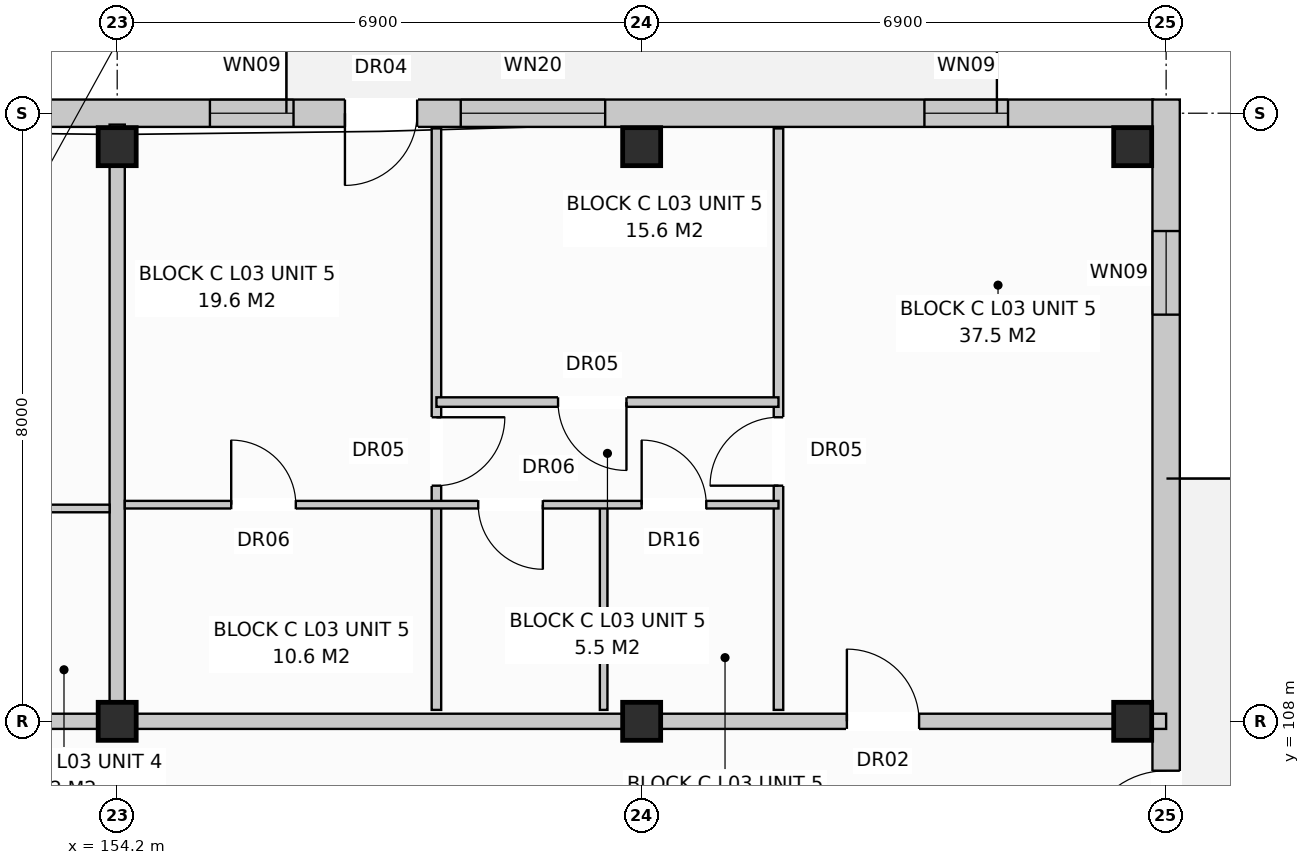
"""IFC4 building model, lengths in metres.
Left out: names, types, materials, properties, quantities, classifications, styles, units other than length and angle.
Written with IfcOpenShell. Run it as: python <this file> out.ifc"""

import sys

from ifc_helpers import new_model, si_unit, direction, frame, frame_2d, origin, origin_with_axes, origin_2d, place, context, subcontext, project, spatial, rectangle, extrude, element, fill, save


model = new_model("IFC4")
c1 = context("Model", 3, precision=1e-05, world=origin(), true_north=direction((0.0, 1.0)))
c2 = subcontext(c1, "Body", "Model", "MODEL_VIEW")
j1 = project(units=[si_unit("LENGTHUNIT", "METRE"), si_unit("PLANEANGLEUNIT", "RADIAN")], contexts=[c1])
p1 = place(None, origin())
s1 = spatial("IfcSite", under=j1, at=p1, CompositionType="ELEMENT")
p2 = place(p1, origin())
s2 = spatial("IfcBuilding", under=s1, at=p2, CompositionType="ELEMENT")
p3 = place(p2, frame((0.0, 0.0, 11.2)))
s3 = spatial("IfcBuildingStorey", under=s2, at=p3, CompositionType="ELEMENT", Elevation=11.2)
for number, where, z_axis, x_axis in (
    (1, (154.2, 108.0, 0.0), (0.0, 0.0, 1.0), (1.0, 0.0, 0.0)),
    (2, (154.2, 115.56, 0.0), (0.0, 0.0, 1.0), (1.0, 0.0, 0.0)),
    (3, (161.1, 108.0, 0.0), (0.0, 0.0, 1.0), (1.0, 0.0, 0.0)),
    (4, (161.1, 115.56, 0.0), (0.0, 0.0, 1.0), (1.0, 0.0, 0.0)),
    (5, (167.56, 108.0, 0.0), (0.0, 0.0, 1.0), (1.0, 0.0, 0.0)),
    (6, (167.56, 115.56, 0.0), (0.0, 0.0, 1.0), (1.0, 0.0, 0.0)),
):
    element("IfcColumn", number, at=place(p3, frame(where, z_axis=z_axis, x_axis=x_axis)), inside=s3, PredefinedType="COLUMN", context=c2, shape_type="SweptSolid", body=[
        extrude(rectangle(XDim=0.5, YDim=0.5, at=origin_2d()), origin(), (0.0, 0.0, 1.0), 3.2),
    ])
p4 = place(p3, frame((112.97, 116.0, 0.0), z_axis=(0.0, 0.0, 1.0), x_axis=(1.0, 0.0, 0.0)))
e7 = element("IfcWall", 7, at=p4, inside=s3, PredefinedType="STANDARD", context=c2, shape_type="SweptSolid", body=[
    extrude(rectangle(XDim=54.86, YDim=0.36, at=frame_2d((27.43, 0.0))), origin(), (0.0, 0.0, 1.0), 2.94),
])
p5 = place(p4, frame((2.497, 0.0, 0.0)))
e8 = element("IfcOpeningElement", 8, at=p5, cuts=e7, PredefinedType="OPENING", context=c2, shape_type="SweptSolid", body=[
    extrude(rectangle(XDim=0.95, YDim=2.1, at=frame_2d((0.475, 1.05))), frame((0.0, 0.192, 0.0), z_axis=(0.0, -1.0, 0.0), x_axis=(1.0, 0.0, 0.0)), (0.0, 0.0, 1.0), 0.384),
])
p6 = place(p4, frame((17.026, 0.0, 0.0)))
e9 = element("IfcOpeningElement", 9, at=p6, cuts=e7, PredefinedType="OPENING", context=c2, shape_type="SweptSolid", body=[
    extrude(rectangle(XDim=0.95, YDim=2.1, at=frame_2d((0.475, 1.05))), frame((0.0, 0.192, 0.0), z_axis=(0.0, -1.0, 0.0), x_axis=(1.0, 0.0, 0.0)), (0.0, 0.0, 1.0), 0.384),
])
p7 = place(p4, frame((30.126, 0.0, 0.0)))
e10 = element("IfcOpeningElement", 10, at=p7, cuts=e7, PredefinedType="OPENING", context=c2, shape_type="SweptSolid", body=[
    extrude(rectangle(XDim=0.95, YDim=2.1, at=frame_2d((0.475, 1.05))), frame((0.0, 0.192, 0.0), z_axis=(0.0, -1.0, 0.0), x_axis=(1.0, 0.0, 0.0)), (0.0, 0.0, 1.0), 0.384),
])
p8 = place(p4, frame((44.226, 0.0, 0.0)))
e11 = element("IfcOpeningElement", 11, at=p8, cuts=e7, PredefinedType="OPENING", context=c2, shape_type="SweptSolid", body=[
    extrude(rectangle(XDim=0.95, YDim=2.1, at=frame_2d((0.475, 1.05))), frame((0.0, 0.192, 0.0), z_axis=(0.0, -1.0, 0.0), x_axis=(1.0, 0.0, 0.0)), (0.0, 0.0, 1.0), 0.384),
])
p9 = place(p4, frame((0.645, 0.0, 0.85)))
e12 = element("IfcOpeningElement", 12, at=p9, cuts=e7, PredefinedType="OPENING", context=c2, shape_type="SweptSolid", body=[
    extrude(rectangle(XDim=1.55, YDim=1.55, at=frame_2d((0.775, 0.775))), frame((0.0, 0.192, 0.0), z_axis=(0.0, -1.0, 0.0), x_axis=(1.0, 0.0, 0.0)), (0.0, 0.0, 1.0), 0.384),
])
p10 = place(p4, frame((4.3, 0.0, 0.8)))
e13 = element("IfcOpeningElement", 13, at=p10, cuts=e7, PredefinedType="OPENING", context=c2, shape_type="SweptSolid", body=[
    extrude(rectangle(XDim=1.8, YDim=1.7, at=frame_2d((0.9, 0.85))), frame((0.0, 0.192, 0.0), z_axis=(0.0, -1.0, 0.0), x_axis=(1.0, 0.0, 0.0)), (0.0, 0.0, 1.0), 0.384),
])
p11 = place(p4, frame((9.35, 0.0, 0.72)))
e14 = element("IfcOpeningElement", 14, at=p11, cuts=e7, PredefinedType="OPENING", context=c2, shape_type="SweptSolid", body=[
    extrude(rectangle(XDim=1.1, YDim=1.5, at=frame_2d((0.55, 0.75))), frame((0.0, 0.192, 0.0), z_axis=(0.0, -1.0, 0.0), x_axis=(1.0, 0.0, 0.0)), (0.0, 0.0, 1.0), 0.384),
])
p12 = place(p4, frame((15.05, 0.0, 0.72)))
e15 = element("IfcOpeningElement", 15, at=p12, cuts=e7, PredefinedType="OPENING", context=c2, shape_type="SweptSolid", body=[
    extrude(rectangle(XDim=1.1, YDim=1.5, at=frame_2d((0.55, 0.75))), frame((0.0, 0.192, 0.0), z_axis=(0.0, -1.0, 0.0), x_axis=(1.0, 0.0, 0.0)), (0.0, 0.0, 1.0), 0.384),
])
p13 = place(p4, frame((21.1, 0.0, 0.8)))
e16 = element("IfcOpeningElement", 16, at=p13, cuts=e7, PredefinedType="OPENING", context=c2, shape_type="SweptSolid", body=[
    extrude(rectangle(XDim=1.8, YDim=1.7, at=frame_2d((0.9, 0.85))), frame((0.0, 0.192, 0.0), z_axis=(0.0, -1.0, 0.0), x_axis=(1.0, 0.0, 0.0)), (0.0, 0.0, 1.0), 0.384),
])
p14 = place(p4, frame((24.85, 0.0, 0.72)))
e17 = element("IfcOpeningElement", 17, at=p14, cuts=e7, PredefinedType="OPENING", context=c2, shape_type="SweptSolid", body=[
    extrude(rectangle(XDim=1.1, YDim=1.5, at=frame_2d((0.55, 0.75))), frame((0.0, 0.192, 0.0), z_axis=(0.0, -1.0, 0.0), x_axis=(1.0, 0.0, 0.0)), (0.0, 0.0, 1.0), 0.384),
])
p15 = place(p4, frame((28.35, 0.0, 0.72)))
e18 = element("IfcOpeningElement", 18, at=p15, cuts=e7, PredefinedType="OPENING", context=c2, shape_type="SweptSolid", body=[
    extrude(rectangle(XDim=1.1, YDim=1.5, at=frame_2d((0.55, 0.75))), frame((0.0, 0.192, 0.0), z_axis=(0.0, -1.0, 0.0), x_axis=(1.0, 0.0, 0.0)), (0.0, 0.0, 1.0), 0.384),
])
p16 = place(p4, frame((31.9, 0.0, 0.8)))
e19 = element("IfcOpeningElement", 19, at=p16, cuts=e7, PredefinedType="OPENING", context=c2, shape_type="SweptSolid", body=[
    extrude(rectangle(XDim=1.8, YDim=1.7, at=frame_2d((0.9, 0.85))), frame((0.0, 0.192, 0.0), z_axis=(0.0, -1.0, 0.0), x_axis=(1.0, 0.0, 0.0)), (0.0, 0.0, 1.0), 0.384),
])
p17 = place(p4, frame((35.55, 0.0, 0.72)))
e20 = element("IfcOpeningElement", 20, at=p17, cuts=e7, PredefinedType="OPENING", context=c2, shape_type="SweptSolid", body=[
    extrude(rectangle(XDim=1.9, YDim=1.85, at=frame_2d((0.95, 0.925))), frame((0.0, 0.192, 0.0), z_axis=(0.0, -1.0, 0.0), x_axis=(1.0, 0.0, 0.0)), (0.0, 0.0, 1.0), 0.384),
])
p18 = place(p4, frame((39.25, 0.0, 0.72)))
e21 = element("IfcOpeningElement", 21, at=p18, cuts=e7, PredefinedType="OPENING", context=c2, shape_type="SweptSolid", body=[
    extrude(rectangle(XDim=1.1, YDim=1.5, at=frame_2d((0.55, 0.75))), frame((0.0, 0.192, 0.0), z_axis=(0.0, -1.0, 0.0), x_axis=(1.0, 0.0, 0.0)), (0.0, 0.0, 1.0), 0.384),
])
p19 = place(p4, frame((42.45, 0.0, 0.72)))
e22 = element("IfcOpeningElement", 22, at=p19, cuts=e7, PredefinedType="OPENING", context=c2, shape_type="SweptSolid", body=[
    extrude(rectangle(XDim=1.1, YDim=1.5, at=frame_2d((0.55, 0.75))), frame((0.0, 0.192, 0.0), z_axis=(0.0, -1.0, 0.0), x_axis=(1.0, 0.0, 0.0)), (0.0, 0.0, 1.0), 0.384),
])
p20 = place(p4, frame((45.75, 0.0, 0.72)))
e23 = element("IfcOpeningElement", 23, at=p20, cuts=e7, PredefinedType="OPENING", context=c2, shape_type="SweptSolid", body=[
    extrude(rectangle(XDim=1.9, YDim=1.85, at=frame_2d((0.95, 0.925))), frame((0.0, 0.192, 0.0), z_axis=(0.0, -1.0, 0.0), x_axis=(1.0, 0.0, 0.0)), (0.0, 0.0, 1.0), 0.384),
])
p21 = place(p4, frame((51.85, 0.0, 0.72)))
e24 = element("IfcOpeningElement", 24, at=p21, cuts=e7, PredefinedType="OPENING", context=c2, shape_type="SweptSolid", body=[
    extrude(rectangle(XDim=1.1, YDim=1.5, at=frame_2d((0.55, 0.75))), frame((0.0, 0.192, 0.0), z_axis=(0.0, -1.0, 0.0), x_axis=(1.0, 0.0, 0.0)), (0.0, 0.0, 1.0), 0.384),
])
p22 = place(p3, frame((168.0, 97.42, 0.0), z_axis=(0.0, 0.0, 1.0), x_axis=(0.0, 1.0, 0.0)))
e25 = element("IfcWall", 25, at=p22, inside=s3, PredefinedType="STANDARD", context=c2, shape_type="SweptSolid", body=[
    extrude(rectangle(XDim=18.76, YDim=0.36, at=frame_2d((9.38, 0.0))), origin(), (0.0, 0.0, 1.0), 2.94),
])
p23 = place(p22, frame((8.83, 0.0, 0.0)))
e26 = element("IfcOpeningElement", 26, at=p23, cuts=e25, PredefinedType="OPENING", context=c2, shape_type="SweptSolid", body=[
    extrude(rectangle(XDim=1.1, YDim=2.1, at=frame_2d((0.55, 1.05))), frame((0.0, 0.192, 0.0), z_axis=(0.0, -1.0, 0.0), x_axis=(1.0, 0.0, 0.0)), (0.0, 0.0, 1.0), 0.384),
])
p24 = place(p22, frame((1.73, 0.0, 0.72)))
e27 = element("IfcOpeningElement", 27, at=p24, cuts=e25, PredefinedType="OPENING", context=c2, shape_type="SweptSolid", body=[
    extrude(rectangle(XDim=1.1, YDim=1.5, at=frame_2d((0.55, 0.75))), frame((0.0, 0.192, 0.0), z_axis=(0.0, -1.0, 0.0), x_axis=(1.0, 0.0, 0.0)), (0.0, 0.0, 1.0), 0.384),
])
p25 = place(p22, frame((15.93, 0.0, 0.72)))
e28 = element("IfcOpeningElement", 28, at=p25, cuts=e25, PredefinedType="OPENING", context=c2, shape_type="SweptSolid", body=[
    extrude(rectangle(XDim=1.1, YDim=1.5, at=frame_2d((0.55, 0.75))), frame((0.0, 0.192, 0.0), z_axis=(0.0, -1.0, 0.0), x_axis=(1.0, 0.0, 0.0)), (0.0, 0.0, 1.0), 0.384),
])
p26 = place(p3, frame((154.2, 108.15, 0.0), z_axis=(0.0, 0.0, 1.0), x_axis=(0.0, 1.0, 0.0)))
e29 = element("IfcWall", 29, at=p26, inside=s3, PredefinedType="PARTITIONING", context=c2, shape_type="SweptSolid", body=[
    extrude(rectangle(XDim=7.7, YDim=0.2, at=frame_2d((3.85, 0.0))), origin(), (0.0, 0.0, 1.0), 2.94),
])
p27 = place(p3, frame((147.3, 108.0, 0.0), z_axis=(0.0, 0.0, 1.0), x_axis=(1.0, 0.0, 0.0)))
e30 = element("IfcWall", 30, at=p27, inside=s3, PredefinedType="PARTITIONING", context=c2, shape_type="SweptSolid", body=[
    extrude(rectangle(XDim=6.9, YDim=0.2, at=frame_2d((3.45, 0.0))), origin(), (0.0, 0.0, 1.0), 2.38),
])
p28 = place(p27, frame((2.0, 0.0, 0.0)))
e31 = element("IfcOpeningElement", 31, at=p28, cuts=e30, PredefinedType="OPENING", context=c2, shape_type="SweptSolid", body=[
    extrude(rectangle(XDim=0.95, YDim=2.15, at=frame_2d((0.475, 1.075))), frame((0.0, 0.112, 0.0), z_axis=(0.0, -1.0, 0.0), x_axis=(1.0, 0.0, 0.0)), (0.0, 0.0, 1.0), 0.224),
])
p29 = place(p3, frame((151.6, 110.8, 0.0), z_axis=(0.0, 0.0, 1.0), x_axis=(1.0, 0.0, 0.0)))
e32 = element("IfcWall", 32, at=p29, inside=s3, PredefinedType="PARTITIONING", context=c2, shape_type="SweptSolid", body=[
    extrude(rectangle(XDim=2.5, YDim=0.1, at=frame_2d((1.25, 0.0))), origin(), (0.0, 0.0, 1.0), 2.94),
])
p30 = place(p3, frame((154.2, 108.0, 0.0), z_axis=(0.0, 0.0, 1.0), x_axis=(1.0, 0.0, 0.0)))
e33 = element("IfcWall", 33, at=p30, inside=s3, PredefinedType="PARTITIONING", context=c2, shape_type="SweptSolid", body=[
    extrude(rectangle(XDim=13.8, YDim=0.2, at=frame_2d((6.9, 0.0))), origin(), (0.0, 0.0, 1.0), 2.38),
])
p31 = place(p30, frame((9.6, 0.0, 0.0)))
e34 = element("IfcOpeningElement", 34, at=p31, cuts=e33, PredefinedType="OPENING", context=c2, shape_type="SweptSolid", body=[
    extrude(rectangle(XDim=0.95, YDim=2.15, at=frame_2d((0.475, 1.075))), frame((0.0, 0.112, 0.0), z_axis=(0.0, -1.0, 0.0), x_axis=(1.0, 0.0, 0.0)), (0.0, 0.0, 1.0), 0.224),
])
p32 = place(p3, frame((162.9, 108.15, 0.0), z_axis=(0.0, 0.0, 1.0), x_axis=(0.0, 1.0, 0.0)))
e35 = element("IfcWall", 35, at=p32, inside=s3, PredefinedType="PARTITIONING", context=c2, shape_type="SweptSolid", body=[
    extrude(rectangle(XDim=7.65, YDim=0.125, at=frame_2d((3.825, 0.0))), origin(), (0.0, 0.0, 1.0), 2.94),
])
p33 = place(p32, frame((2.95, 0.0, 0.0)))
e36 = element("IfcOpeningElement", 36, at=p33, cuts=e35, PredefinedType="OPENING", context=c2, shape_type="SweptSolid", body=[
    extrude(rectangle(XDim=0.9, YDim=2.1, at=frame_2d((0.45, 1.05))), frame((0.0, 0.074, 0.0), z_axis=(0.0, -1.0, 0.0), x_axis=(1.0, 0.0, 0.0)), (0.0, 0.0, 1.0), 0.149),
])
p34 = place(p3, frame((158.4, 108.15, 0.0), z_axis=(0.0, 0.0, 1.0), x_axis=(0.0, 1.0, 0.0)))
e37 = element("IfcWall", 37, at=p34, inside=s3, PredefinedType="PARTITIONING", context=c2, shape_type="SweptSolid", body=[
    extrude(rectangle(XDim=7.65, YDim=0.125, at=frame_2d((3.825, 0.0))), origin(), (0.0, 0.0, 1.0), 2.94),
])
p35 = place(p34, frame((2.95, 0.0, 0.0)))
e38 = element("IfcOpeningElement", 38, at=p35, cuts=e37, PredefinedType="OPENING", context=c2, shape_type="SweptSolid", body=[
    extrude(rectangle(XDim=0.9, YDim=2.1, at=frame_2d((0.45, 1.05))), frame((0.0, 0.074, 0.0), z_axis=(0.0, -1.0, 0.0), x_axis=(1.0, 0.0, 0.0)), (0.0, 0.0, 1.0), 0.149),
])
p36 = place(p3, frame((160.6, 108.15, 0.0), z_axis=(0.0, 0.0, 1.0), x_axis=(0.0, 1.0, 0.0)))
e39 = element("IfcWall", 39, at=p36, inside=s3, PredefinedType="PARTITIONING", context=c2, shape_type="SweptSolid", body=[
    extrude(rectangle(XDim=2.7, YDim=0.1, at=frame_2d((1.35, 0.0))), origin(), (0.0, 0.0, 1.0), 2.94),
])
p37 = place(p3, frame((154.3, 110.85, 0.0), z_axis=(0.0, 0.0, 1.0), x_axis=(1.0, 0.0, 0.0)))
e40 = element("IfcWall", 40, at=p37, inside=s3, PredefinedType="PARTITIONING", context=c2, shape_type="SweptSolid", body=[
    extrude(rectangle(XDim=8.6, YDim=0.1, at=frame_2d((4.3, 0.0))), origin(), (0.0, 0.0, 1.0), 2.94),
])
p38 = place(p37, frame((1.4, 0.0, 0.0)))
e41 = element("IfcOpeningElement", 41, at=p38, cuts=e40, PredefinedType="OPENING", context=c2, shape_type="SweptSolid", body=[
    extrude(rectangle(XDim=0.85, YDim=2.05, at=frame_2d((0.425, 1.025))), frame((0.0, 0.062, 0.0), z_axis=(0.0, -1.0, 0.0), x_axis=(1.0, 0.0, 0.0)), (0.0, 0.0, 1.0), 0.124),
])
p39 = place(p37, frame((4.65, 0.0, 0.0)))
e42 = element("IfcOpeningElement", 42, at=p39, cuts=e40, PredefinedType="OPENING", context=c2, shape_type="SweptSolid", body=[
    extrude(rectangle(XDim=0.85, YDim=2.05, at=frame_2d((0.425, 1.025))), frame((0.0, 0.062, 0.0), z_axis=(0.0, -1.0, 0.0), x_axis=(1.0, 0.0, 0.0)), (0.0, 0.0, 1.0), 0.124),
])
p40 = place(p37, frame((6.8, 0.0, 0.0)))
e43 = element("IfcOpeningElement", 43, at=p40, cuts=e40, PredefinedType="OPENING", context=c2, shape_type="SweptSolid", body=[
    extrude(rectangle(XDim=0.85, YDim=2.1, at=frame_2d((0.425, 1.05))), frame((0.0, 0.062, 0.0), z_axis=(0.0, -1.0, 0.0), x_axis=(1.0, 0.0, 0.0)), (0.0, 0.0, 1.0), 0.124),
])
p41 = place(p3, frame((158.4, 112.2, 0.0), z_axis=(0.0, 0.0, 1.0), x_axis=(1.0, 0.0, 0.0)))
e44 = element("IfcWall", 44, at=p41, inside=s3, PredefinedType="PARTITIONING", context=c2, shape_type="SweptSolid", body=[
    extrude(rectangle(XDim=4.5, YDim=0.125, at=frame_2d((2.25, 0.0))), origin(), (0.0, 0.0, 1.0), 2.94),
])
p42 = place(p41, frame((1.6, 0.0, 0.0)))
e45 = element("IfcOpeningElement", 45, at=p42, cuts=e44, PredefinedType="OPENING", context=c2, shape_type="SweptSolid", body=[
    extrude(rectangle(XDim=0.9, YDim=2.1, at=frame_2d((0.45, 1.05))), frame((0.0, 0.074, 0.0), z_axis=(0.0, -1.0, 0.0), x_axis=(1.0, 0.0, 0.0)), (0.0, 0.0, 1.0), 0.149),
])
p43 = place(p8, frame((0.95, 0.0, 0.0), z_axis=(0.0, 0.0, 1.0), x_axis=(-1.0, 0.0, 0.0)))
e46 = element("IfcDoor", 46, at=p43, inside=s3, OperationType="SINGLE_SWING_LEFT", PredefinedType="DOOR", context=c2, shape_type="SweptSolid", body=[
    extrude(rectangle(XDim=0.95, YDim=2.1, at=frame_2d((0.475, 1.05))), frame((0.0, 0.025, 0.0), z_axis=(0.0, -1.0, 0.0), x_axis=(1.0, 0.0, 0.0)), (0.0, 0.0, 1.0), 0.05),
])
fill(e11, e46)
p44 = place(p19, origin_with_axes())
e47 = element("IfcWindow", 47, at=p44, inside=s3, PartitioningType="SINGLE_PANEL", PredefinedType="WINDOW", context=c2, shape_type="SweptSolid", body=[
    extrude(rectangle(XDim=1.1, YDim=1.5, at=frame_2d((0.55, 0.75))), frame((0.0, 0.03, 0.0), z_axis=(0.0, -1.0, 0.0), x_axis=(1.0, 0.0, 0.0)), (0.0, 0.0, 1.0), 0.06),
])
fill(e22, e47)
p45 = place(p20, origin_with_axes())
e48 = element("IfcWindow", 48, at=p45, inside=s3, PartitioningType="SINGLE_PANEL", PredefinedType="WINDOW", context=c2, shape_type="SweptSolid", body=[
    extrude(rectangle(XDim=1.9, YDim=1.85, at=frame_2d((0.95, 0.925))), frame((0.0, 0.03, 0.0), z_axis=(0.0, -1.0, 0.0), x_axis=(1.0, 0.0, 0.0)), (0.0, 0.0, 1.0), 0.06),
])
fill(e23, e48)
p46 = place(p21, origin_with_axes())
e49 = element("IfcWindow", 49, at=p46, inside=s3, PartitioningType="SINGLE_PANEL", PredefinedType="WINDOW", context=c2, shape_type="SweptSolid", body=[
    extrude(rectangle(XDim=1.1, YDim=1.5, at=frame_2d((0.55, 0.75))), frame((0.0, 0.03, 0.0), z_axis=(0.0, -1.0, 0.0), x_axis=(1.0, 0.0, 0.0)), (0.0, 0.0, 1.0), 0.06),
])
fill(e24, e49)
p47 = place(p23, origin_with_axes())
e50 = element("IfcDoor", 50, at=p47, inside=s3, OperationType="SINGLE_SWING_LEFT", PredefinedType="DOOR", context=c2, shape_type="SweptSolid", body=[
    extrude(rectangle(XDim=1.1, YDim=2.1, at=frame_2d((0.55, 1.05))), frame((0.0, 0.025, 0.0), z_axis=(0.0, -1.0, 0.0), x_axis=(1.0, 0.0, 0.0)), (0.0, 0.0, 1.0), 0.05),
])
fill(e26, e50)
p48 = place(p25, origin_with_axes())
e51 = element("IfcWindow", 51, at=p48, inside=s3, PartitioningType="SINGLE_PANEL", PredefinedType="WINDOW", context=c2, shape_type="SweptSolid", body=[
    extrude(rectangle(XDim=1.1, YDim=1.5, at=frame_2d((0.55, 0.75))), frame((0.0, 0.03, 0.0), z_axis=(0.0, -1.0, 0.0), x_axis=(1.0, 0.0, 0.0)), (0.0, 0.0, 1.0), 0.06),
])
fill(e28, e51)
p49 = place(p31, origin_with_axes())
e52 = element("IfcDoor", 52, at=p49, inside=s3, OperationType="SINGLE_SWING_LEFT", PredefinedType="DOOR", context=c2, shape_type="SweptSolid", body=[
    extrude(rectangle(XDim=0.95, YDim=2.15, at=frame_2d((0.475, 1.075))), frame((0.0, 0.025, 0.0), z_axis=(0.0, -1.0, 0.0), x_axis=(1.0, 0.0, 0.0)), (0.0, 0.0, 1.0), 0.05),
])
fill(e34, e52)
p50 = place(p33, origin_with_axes())
e53 = element("IfcDoor", 53, at=p50, inside=s3, OperationType="SINGLE_SWING_LEFT", PredefinedType="DOOR", context=c2, shape_type="SweptSolid", body=[
    extrude(rectangle(XDim=0.9, YDim=2.1, at=frame_2d((0.45, 1.05))), frame((0.0, 0.025, 0.0), z_axis=(0.0, -1.0, 0.0), x_axis=(1.0, 0.0, 0.0)), (0.0, 0.0, 1.0), 0.05),
])
fill(e36, e53)
p51 = place(p35, frame((0.9, 0.0, 0.0), z_axis=(0.0, 0.0, 1.0), x_axis=(-1.0, 0.0, 0.0)))
e54 = element("IfcDoor", 54, at=p51, inside=s3, OperationType="SINGLE_SWING_RIGHT", PredefinedType="DOOR", context=c2, shape_type="SweptSolid", body=[
    extrude(rectangle(XDim=0.9, YDim=2.1, at=frame_2d((0.45, 1.05))), frame((0.0, 0.025, 0.0), z_axis=(0.0, -1.0, 0.0), x_axis=(1.0, 0.0, 0.0)), (0.0, 0.0, 1.0), 0.05),
])
fill(e38, e54)
p52 = place(p38, origin_with_axes())
e55 = element("IfcDoor", 55, at=p52, inside=s3, OperationType="SINGLE_SWING_LEFT", PredefinedType="DOOR", context=c2, shape_type="SweptSolid", body=[
    extrude(rectangle(XDim=0.85, YDim=2.05, at=frame_2d((0.425, 1.025))), frame((0.0, 0.025, 0.0), z_axis=(0.0, -1.0, 0.0), x_axis=(1.0, 0.0, 0.0)), (0.0, 0.0, 1.0), 0.05),
])
fill(e41, e55)
p53 = place(p39, frame((0.85, 0.0, 0.0), z_axis=(0.0, 0.0, 1.0), x_axis=(-1.0, 0.0, 0.0)))
e56 = element("IfcDoor", 56, at=p53, inside=s3, OperationType="SINGLE_SWING_RIGHT", PredefinedType="DOOR", context=c2, shape_type="SweptSolid", body=[
    extrude(rectangle(XDim=0.85, YDim=2.05, at=frame_2d((0.425, 1.025))), frame((0.0, 0.025, 0.0), z_axis=(0.0, -1.0, 0.0), x_axis=(1.0, 0.0, 0.0)), (0.0, 0.0, 1.0), 0.05),
])
fill(e42, e56)
p54 = place(p40, origin_with_axes())
e57 = element("IfcDoor", 57, at=p54, inside=s3, OperationType="SINGLE_SWING_LEFT", PredefinedType="DOOR", context=c2, shape_type="SweptSolid", body=[
    extrude(rectangle(XDim=0.85, YDim=2.1, at=frame_2d((0.425, 1.05))), frame((0.0, 0.025, 0.0), z_axis=(0.0, -1.0, 0.0), x_axis=(1.0, 0.0, 0.0)), (0.0, 0.0, 1.0), 0.05),
])
fill(e43, e57)
p55 = place(p42, frame((0.9, 0.0, 0.0), z_axis=(0.0, 0.0, 1.0), x_axis=(-1.0, 0.0, 0.0)))
e58 = element("IfcDoor", 58, at=p55, inside=s3, OperationType="SINGLE_SWING_RIGHT", PredefinedType="DOOR", context=c2, shape_type="SweptSolid", body=[
    extrude(rectangle(XDim=0.9, YDim=2.1, at=frame_2d((0.45, 1.05))), frame((0.0, 0.025, 0.0), z_axis=(0.0, -1.0, 0.0), x_axis=(1.0, 0.0, 0.0)), (0.0, 0.0, 1.0), 0.05),
])
fill(e45, e58)
save(model, sys.argv[1])
